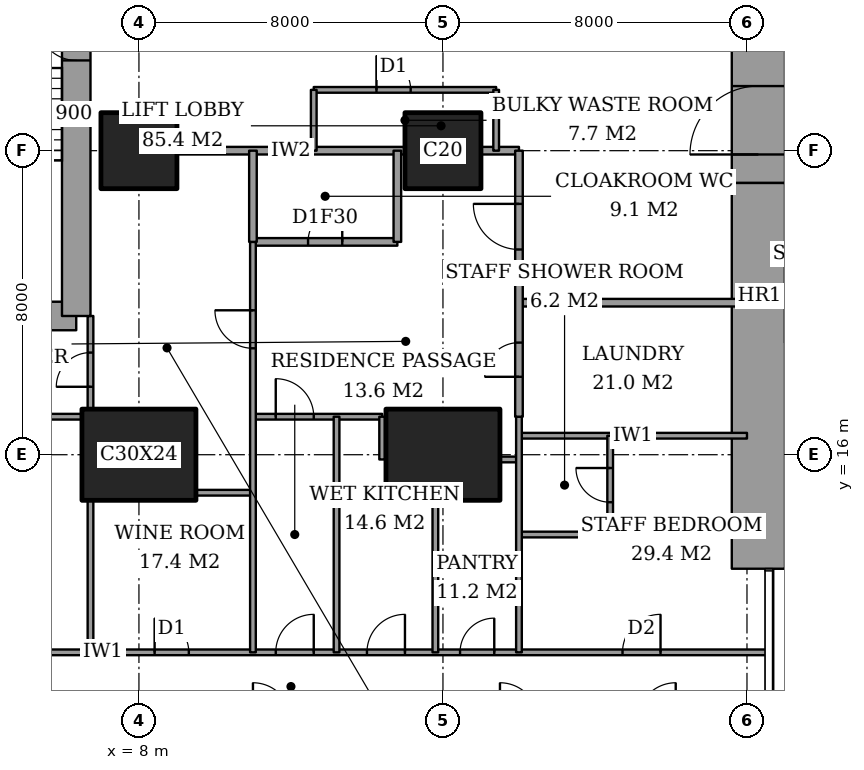
"""IFC4 building model, lengths in metres.
Left out: names, types, materials, properties, quantities, classifications, styles, units other than length and angle.
Written with IfcOpenShell. Run it as: python <this file> out.ifc"""

import sys

from ifc_helpers import new_model, si_unit, direction, frame, frame_2d, origin, origin_2d, place, context, subcontext, project, spatial, rectangle, extrude, element, fill, save


model = new_model("IFC4")
c1 = context("Model", 3, precision=1e-05, world=origin(), true_north=direction((0.0, 1.0)))
c2 = subcontext(c1, "Body", "Model", "MODEL_VIEW")
j1 = project(units=[si_unit("LENGTHUNIT", "METRE"), si_unit("PLANEANGLEUNIT", "RADIAN")], contexts=[c1])
p1 = place(None, origin())
s1 = spatial("IfcSite", under=j1, at=p1, CompositionType="ELEMENT")
p2 = place(p1, origin())
s2 = spatial("IfcBuilding", under=s1, at=p2, CompositionType="ELEMENT")
p3 = place(p2, frame((0.0, 0.0, 99.8)))
s3 = spatial("IfcBuildingStorey", under=s2, at=p3, CompositionType="ELEMENT", Elevation=99.8)
p4 = place(p3, frame((8.0, 16.0, 0.0), z_axis=(0.0, 0.0, 1.0), x_axis=(1.0, 0.0, 0.0)))
e1 = element("IfcColumn", 1, at=p4, inside=s3, PredefinedType="COLUMN", context=c2, shape_type="SweptSolid", body=[
    extrude(rectangle(XDim=3.0, YDim=2.4, at=origin_2d()), origin(), (0.0, 0.0, 1.0), 3.6),
])
p5 = place(p3, frame((8.0, 24.0, 0.0), z_axis=(0.0, 0.0, 1.0), x_axis=(1.0, 0.0, 0.0)))
e2 = element("IfcColumn", 2, at=p5, inside=s3, PredefinedType="COLUMN", context=c2, shape_type="SweptSolid", body=[
    extrude(rectangle(XDim=2.0, YDim=2.0, at=origin_2d()), origin(), (0.0, 0.0, 1.0), 3.6),
])
p6 = place(p3, frame((16.0, 16.0, 0.0), z_axis=(0.0, 0.0, 1.0), x_axis=(1.0, 0.0, 0.0)))
e3 = element("IfcColumn", 3, at=p6, inside=s3, PredefinedType="COLUMN", context=c2, shape_type="SweptSolid", body=[
    extrude(rectangle(XDim=3.0, YDim=2.4, at=origin_2d()), origin(), (0.0, 0.0, 1.0), 3.6),
])
p7 = place(p3, frame((16.0, 24.0, 0.0), z_axis=(0.0, 0.0, 1.0), x_axis=(1.0, 0.0, 0.0)))
e4 = element("IfcColumn", 4, at=p7, inside=s3, PredefinedType="COLUMN", context=c2, shape_type="SweptSolid", body=[
    extrude(rectangle(XDim=2.0, YDim=2.0, at=origin_2d()), origin(), (0.0, 0.0, 1.0), 3.6),
])
p8 = place(p3, frame((24.3, 13.0, 0.0), z_axis=(0.0, 0.0, 1.0), x_axis=(0.0, 1.0, 0.0)))
e5 = element("IfcWall", 5, at=p8, inside=s3, PredefinedType="SHEAR", context=c2, shape_type="SweptSolid", body=[
    extrude(rectangle(XDim=10.15, YDim=1.4, at=frame_2d((5.075, 0.0))), origin(), (0.0, 0.0, 1.0), 3.6),
])
p9 = place(p3, frame((24.3, 23.15, 0.0), z_axis=(0.0, 0.0, 1.0), x_axis=(0.0, 1.0, 0.0)))
e6 = element("IfcWall", 6, at=p9, inside=s3, PredefinedType="SHEAR", context=c2, shape_type="SweptSolid", body=[
    extrude(rectangle(XDim=11.85, YDim=1.4, at=frame_2d((5.925, 0.0))), origin(), (0.0, 0.0, 1.0), 3.6),
])
p10 = place(p9, frame((0.75, 0.0, 0.0)))
e7 = element("IfcOpeningElement", 7, at=p10, cuts=e6, PredefinedType="OPENING", context=c2, shape_type="SweptSolid", body=[
    extrude(rectangle(XDim=1.8, YDim=2.4, at=frame_2d((0.9, 1.2))), frame((0.0, 0.71, 0.0), z_axis=(0.0, -1.0, 0.0), x_axis=(1.0, 0.0, 0.0)), (0.0, 0.0, 1.0), 1.42),
])
p11 = place(p3, frame((1.9, 19.65, 0.0), z_axis=(0.0, 0.0, 1.0), x_axis=(1.0, 0.0, 0.0)))
e8 = element("IfcWall", 8, at=p11, inside=s3, PredefinedType="SHEAR", context=c2, shape_type="SweptSolid", body=[
    extrude(rectangle(XDim=4.45, YDim=0.75, at=frame_2d((2.225, 0.0))), origin(), (0.0, 0.0, 1.0), 3.6),
])
p12 = place(p3, frame((6.35, 19.65, 0.0), z_axis=(0.0, 0.0, 1.0), x_axis=(0.0, 1.0, 0.0)))
e9 = element("IfcWall", 9, at=p12, inside=s3, PredefinedType="SHEAR", context=c2, shape_type="SweptSolid", body=[
    extrude(rectangle(XDim=8.7, YDim=0.75, at=frame_2d((4.35, 0.0))), origin(), (0.0, 0.0, 1.0), 3.6),
])
p13 = place(p12, frame((6.725, 0.0, 0.0)))
e10 = element("IfcOpeningElement", 10, at=p13, cuts=e9, PredefinedType="OPENING", context=c2, shape_type="SweptSolid", body=[
    extrude(rectangle(XDim=1.0, YDim=2.1, at=frame_2d((0.5, 1.05))), frame((0.0, 0.385, 0.0), z_axis=(0.0, -1.0, 0.0), x_axis=(1.0, 0.0, 0.0)), (0.0, 0.0, 1.0), 0.77),
])
p14 = place(p3, frame((-0.45, 10.8, 0.0), z_axis=(0.0, 0.0, 1.0), x_axis=(1.0, 0.0, 0.0)))
e11 = element("IfcWall", 11, at=p14, inside=s3, PredefinedType="PARTITIONING", context=c2, shape_type="SweptSolid", body=[
    extrude(rectangle(XDim=25.011, YDim=0.15, at=frame_2d((12.505, 0.0))), origin(), (0.0, 0.0, 1.0), 3.35),
])
p15 = place(p14, frame((12.05, 0.0, 0.0)))
e12 = element("IfcOpeningElement", 12, at=p15, cuts=e11, PredefinedType="OPENING", context=c2, shape_type="SweptSolid", body=[
    extrude(rectangle(XDim=1.0, YDim=2.1, at=frame_2d((0.5, 1.05))), frame((0.0, 0.085, 0.0), z_axis=(0.0, -1.0, 0.0), x_axis=(1.0, 0.0, 0.0)), (0.0, 0.0, 1.0), 0.17),
])
p16 = place(p14, frame((3.087, 0.0, 0.0)))
e13 = element("IfcOpeningElement", 13, at=p16, cuts=e11, PredefinedType="OPENING", context=c2, shape_type="SweptSolid", body=[
    extrude(rectangle(XDim=1.0, YDim=2.1, at=frame_2d((0.5, 1.05))), frame((0.0, 0.085, 0.0), z_axis=(0.0, -1.0, 0.0), x_axis=(1.0, 0.0, 0.0)), (0.0, 0.0, 1.0), 0.17),
])
p17 = place(p14, frame((8.863, 0.0, 0.0)))
e14 = element("IfcOpeningElement", 14, at=p17, cuts=e11, PredefinedType="OPENING", context=c2, shape_type="SweptSolid", body=[
    extrude(rectangle(XDim=0.9, YDim=2.1, at=frame_2d((0.45, 1.05))), frame((0.0, 0.085, 0.0), z_axis=(0.0, -1.0, 0.0), x_axis=(1.0, 0.0, 0.0)), (0.0, 0.0, 1.0), 0.17),
])
p18 = place(p14, frame((14.45, 0.0, 0.0)))
e15 = element("IfcOpeningElement", 15, at=p18, cuts=e11, PredefinedType="OPENING", context=c2, shape_type="SweptSolid", body=[
    extrude(rectangle(XDim=1.0, YDim=2.1, at=frame_2d((0.5, 1.05))), frame((0.0, 0.085, 0.0), z_axis=(0.0, -1.0, 0.0), x_axis=(1.0, 0.0, 0.0)), (0.0, 0.0, 1.0), 0.17),
])
p19 = place(p14, frame((16.9, 0.0, 0.0)))
e16 = element("IfcOpeningElement", 16, at=p19, cuts=e11, PredefinedType="OPENING", context=c2, shape_type="SweptSolid", body=[
    extrude(rectangle(XDim=0.9, YDim=2.1, at=frame_2d((0.45, 1.05))), frame((0.0, 0.085, 0.0), z_axis=(0.0, -1.0, 0.0), x_axis=(1.0, 0.0, 0.0)), (0.0, 0.0, 1.0), 0.17),
])
p20 = place(p14, frame((21.175, 0.0, 0.0)))
e17 = element("IfcOpeningElement", 17, at=p20, cuts=e11, PredefinedType="OPENING", context=c2, shape_type="SweptSolid", body=[
    extrude(rectangle(XDim=1.0, YDim=2.1, at=frame_2d((0.5, 1.05))), frame((0.0, 0.085, 0.0), z_axis=(0.0, -1.0, 0.0), x_axis=(1.0, 0.0, 0.0)), (0.0, 0.0, 1.0), 0.17),
])
p21 = place(p3, frame((18.0, 13.9, 0.0), z_axis=(0.0, 0.0, 1.0), x_axis=(1.0, 0.0, 0.0)))
e18 = element("IfcWall", 18, at=p21, inside=s3, PredefinedType="PARTITIONING", context=c2, shape_type="SweptSolid", body=[
    extrude(rectangle(XDim=2.4, YDim=0.15, at=frame_2d((1.2, 0.0))), origin(), (0.0, 0.0, 1.0), 3.35),
])
p22 = place(p3, frame((9.5, 15.0, 0.0), z_axis=(0.0, 0.0, 1.0), x_axis=(1.0, 0.0, 0.0)))
e19 = element("IfcWall", 19, at=p22, inside=s3, PredefinedType="PARTITIONING", context=c2, shape_type="SweptSolid", body=[
    extrude(rectangle(XDim=1.5, YDim=0.15, at=frame_2d((0.75, 0.0))), origin(), (0.0, 0.0, 1.0), 3.35),
])
p23 = place(p3, frame((17.5, 15.875, 0.0), z_axis=(0.0, 0.0, 1.0), x_axis=(1.0, 0.0, 0.0)))
e20 = element("IfcWall", 20, at=p23, inside=s3, PredefinedType="PARTITIONING", context=c2, shape_type="SweptSolid", body=[
    extrude(rectangle(XDim=0.5, YDim=0.15, at=frame_2d((0.25, 0.0))), origin(), (0.0, 0.0, 1.0), 2.634),
])
p24 = place(p3, frame((18.0, 16.5, 0.0), z_axis=(0.0, 0.0, 1.0), x_axis=(1.0, 0.0, 0.0)))
e21 = element("IfcWall", 21, at=p24, inside=s3, PredefinedType="PARTITIONING", context=c2, shape_type="SweptSolid", body=[
    extrude(rectangle(XDim=6.0, YDim=0.15, at=frame_2d((3.0, 0.0))), origin(), (0.0, 0.0, 1.0), 3.35),
])
p25 = place(p3, frame((1.35, 17.0, 0.0), z_axis=(0.0, 0.0, 1.0), x_axis=(1.0, 0.0, 0.0)))
e22 = element("IfcWall", 22, at=p25, inside=s3, PredefinedType="PARTITIONING", context=c2, shape_type="SweptSolid", body=[
    extrude(rectangle(XDim=5.15, YDim=0.15, at=frame_2d((2.575, 0.0))), origin(), (0.0, 0.0, 1.0), 3.35),
])
p26 = place(p3, frame((11.0, 17.0, 0.0), z_axis=(0.0, 0.0, 1.0), x_axis=(1.0, 0.0, 0.0)))
e23 = element("IfcWall", 23, at=p26, inside=s3, PredefinedType="PARTITIONING", context=c2, shape_type="SweptSolid", body=[
    extrude(rectangle(XDim=3.4, YDim=0.15, at=frame_2d((1.7, 0.0))), origin(), (0.0, 0.0, 1.0), 3.35),
])
p27 = place(p26, frame((0.6, 0.0, 0.0)))
e24 = element("IfcOpeningElement", 24, at=p27, cuts=e23, PredefinedType="OPENING", context=c2, shape_type="SweptSolid", body=[
    extrude(rectangle(XDim=1.0, YDim=2.1, at=frame_2d((0.5, 1.05))), frame((0.0, 0.085, 0.0), z_axis=(0.0, -1.0, 0.0), x_axis=(1.0, 0.0, 0.0)), (0.0, 0.0, 1.0), 0.17),
])
p28 = place(p3, frame((18.0, 20.0, 0.0), z_axis=(0.0, 0.0, 1.0), x_axis=(1.0, 0.0, 0.0)))
e25 = element("IfcWall", 25, at=p28, inside=s3, PredefinedType="PARTITIONING", context=c2, shape_type="SweptSolid", body=[
    extrude(rectangle(XDim=6.0, YDim=0.2, at=frame_2d((3.0, 0.0))), origin(), (0.0, 0.0, 1.0), 3.35),
])
p29 = place(p3, frame((11.0, 21.6, 0.0), z_axis=(0.0, 0.0, 1.0), x_axis=(1.0, 0.0, 0.0)))
e26 = element("IfcWall", 26, at=p29, inside=s3, PredefinedType="PARTITIONING", context=c2, shape_type="SweptSolid", body=[
    extrude(rectangle(XDim=3.8, YDim=0.2, at=frame_2d((1.9, 0.0))), origin(), (0.0, 0.0, 1.0), 3.35),
])
p30 = place(p29, frame((1.45, 0.0, 0.0)))
e27 = element("IfcOpeningElement", 27, at=p30, cuts=e26, PredefinedType="OPENING", context=c2, shape_type="SweptSolid", body=[
    extrude(rectangle(XDim=0.9, YDim=2.1, at=frame_2d((0.45, 1.05))), frame((0.0, 0.11, 0.0), z_axis=(0.0, -1.0, 0.0), x_axis=(1.0, 0.0, 0.0)), (0.0, 0.0, 1.0), 0.22),
])
p31 = place(p3, frame((9.0, 24.0, 0.0), z_axis=(0.0, 0.0, 1.0), x_axis=(1.0, 0.0, 0.0)))
e28 = element("IfcWall", 28, at=p31, inside=s3, PredefinedType="PARTITIONING", context=c2, shape_type="SweptSolid", body=[
    extrude(rectangle(XDim=6.0, YDim=0.2, at=frame_2d((3.0, 0.0))), origin(), (0.0, 0.0, 1.0), 3.35),
])
p32 = place(p3, frame((17.0, 24.0, 0.0), z_axis=(0.0, 0.0, 1.0), x_axis=(1.0, 0.0, 0.0)))
e29 = element("IfcWall", 29, at=p32, inside=s3, PredefinedType="PARTITIONING", context=c2, shape_type="SweptSolid", body=[
    extrude(rectangle(XDim=1.0, YDim=0.2, at=frame_2d((0.5, 0.0))), origin(), (0.0, 0.0, 1.0), 3.35),
])
p33 = place(p3, frame((12.6, 25.6, 0.0), z_axis=(0.0, 0.0, 1.0), x_axis=(1.0, 0.0, 0.0)))
e30 = element("IfcWall", 30, at=p33, inside=s3, PredefinedType="PARTITIONING", context=c2, shape_type="SweptSolid", body=[
    extrude(rectangle(XDim=4.8, YDim=0.15, at=frame_2d((2.4, 0.0))), origin(), (0.0, 0.0, 1.0), 3.35),
])
p34 = place(p33, frame((1.65, 0.0, 0.0)))
e31 = element("IfcOpeningElement", 31, at=p34, cuts=e30, PredefinedType="OPENING", context=c2, shape_type="SweptSolid", body=[
    extrude(rectangle(XDim=0.9, YDim=2.1, at=frame_2d((0.45, 1.05))), frame((0.0, 0.085, 0.0), z_axis=(0.0, -1.0, 0.0), x_axis=(1.0, 0.0, 0.0)), (0.0, 0.0, 1.0), 0.17),
])
p35 = place(p3, frame((6.725, 10.8, 0.0), z_axis=(0.0, 0.0, 1.0), x_axis=(0.0, 1.0, 0.0)))
e32 = element("IfcWall", 32, at=p35, inside=s3, PredefinedType="PARTITIONING", context=c2, shape_type="SweptSolid", body=[
    extrude(rectangle(XDim=4.0, YDim=0.15, at=frame_2d((2.0, 0.0))), origin(), (0.0, 0.0, 1.0), 3.35),
])
p36 = place(p3, frame((6.725, 17.2, 0.0), z_axis=(0.0, 0.0, 1.0), x_axis=(0.0, 1.0, 0.0)))
e33 = element("IfcWall", 33, at=p36, inside=s3, PredefinedType="PARTITIONING", context=c2, shape_type="SweptSolid", body=[
    extrude(rectangle(XDim=2.45, YDim=0.15, at=frame_2d((1.225, 0.0))), origin(), (0.0, 0.0, 1.0), 3.35),
])
p37 = place(p36, frame((0.587, 0.0, 0.0)))
e34 = element("IfcOpeningElement", 34, at=p37, cuts=e33, PredefinedType="OPENING", context=c2, shape_type="SweptSolid", body=[
    extrude(rectangle(XDim=0.9, YDim=2.1, at=frame_2d((0.45, 1.05))), frame((0.0, 0.085, 0.0), z_axis=(0.0, -1.0, 0.0), x_axis=(1.0, 0.0, 0.0)), (0.0, 0.0, 1.0), 0.17),
])
p38 = place(p3, frame((11.0, 21.6, 0.0), z_axis=(0.0, 0.0, 1.0), x_axis=(0.0, 1.0, 0.0)))
e35 = element("IfcWall", 35, at=p38, inside=s3, PredefinedType="PARTITIONING", context=c2, shape_type="SweptSolid", body=[
    extrude(rectangle(XDim=2.4, YDim=0.2, at=frame_2d((1.2, 0.0))), origin(), (0.0, 0.0, 1.0), 3.35),
])
p39 = place(p3, frame((11.0, 10.8, 0.0), z_axis=(0.0, 0.0, 1.0), x_axis=(0.0, 1.0, 0.0)))
e36 = element("IfcWall", 36, at=p39, inside=s3, PredefinedType="PARTITIONING", context=c2, shape_type="SweptSolid", body=[
    extrude(rectangle(XDim=10.8, YDim=0.15, at=frame_2d((5.4, 0.0))), origin(), (0.0, 0.0, 1.0), 3.35),
])
p40 = place(p39, frame((8.0, 0.0, 0.0)))
e37 = element("IfcOpeningElement", 37, at=p40, cuts=e36, PredefinedType="OPENING", context=c2, shape_type="SweptSolid", body=[
    extrude(rectangle(XDim=1.0, YDim=2.1, at=frame_2d((0.5, 1.05))), frame((0.0, 0.085, 0.0), z_axis=(0.0, -1.0, 0.0), x_axis=(1.0, 0.0, 0.0)), (0.0, 0.0, 1.0), 0.17),
])
p41 = place(p3, frame((12.6, 24.0, 0.0), z_axis=(0.0, 0.0, 1.0), x_axis=(0.0, 1.0, 0.0)))
e38 = element("IfcWall", 38, at=p41, inside=s3, PredefinedType="PARTITIONING", context=c2, shape_type="SweptSolid", body=[
    extrude(rectangle(XDim=1.6, YDim=0.15, at=frame_2d((0.8, 0.0))), origin(), (0.0, 0.0, 1.0), 3.35),
])
p42 = place(p3, frame((13.2, 10.8, 0.0), z_axis=(0.0, 0.0, 1.0), x_axis=(0.0, 1.0, 0.0)))
e39 = element("IfcWall", 39, at=p42, inside=s3, PredefinedType="PARTITIONING", context=c2, shape_type="SweptSolid", body=[
    extrude(rectangle(XDim=6.2, YDim=0.15, at=frame_2d((3.1, 0.0))), origin(), (0.0, 0.0, 1.0), 3.35),
])
p43 = place(p3, frame((14.4, 15.875, 0.0), z_axis=(0.0, 0.0, 1.0), x_axis=(0.0, 1.0, 0.0)))
e40 = element("IfcWall", 40, at=p43, inside=s3, PredefinedType="PARTITIONING", context=c2, shape_type="SweptSolid", body=[
    extrude(rectangle(XDim=1.125, YDim=0.15, at=frame_2d((0.562, 0.0))), origin(), (0.0, 0.0, 1.0), 3.35),
])
p44 = place(p3, frame((14.8, 21.6, 0.0), z_axis=(0.0, 0.0, 1.0), x_axis=(0.0, 1.0, 0.0)))
e41 = element("IfcWall", 41, at=p44, inside=s3, PredefinedType="PARTITIONING", context=c2, shape_type="SweptSolid", body=[
    extrude(rectangle(XDim=2.4, YDim=0.2, at=frame_2d((1.2, 0.0))), origin(), (0.0, 0.0, 1.0), 3.35),
])
p45 = place(p3, frame((15.8, 10.8, 0.0), z_axis=(0.0, 0.0, 1.0), x_axis=(0.0, 1.0, 0.0)))
e42 = element("IfcWall", 42, at=p45, inside=s3, PredefinedType="PARTITIONING", context=c2, shape_type="SweptSolid", body=[
    extrude(rectangle(XDim=4.0, YDim=0.15, at=frame_2d((2.0, 0.0))), origin(), (0.0, 0.0, 1.0), 3.35),
])
p46 = place(p3, frame((17.4, 24.0, 0.0), z_axis=(0.0, 0.0, 1.0), x_axis=(0.0, 1.0, 0.0)))
e43 = element("IfcWall", 43, at=p46, inside=s3, PredefinedType="PARTITIONING", context=c2, shape_type="SweptSolid", body=[
    extrude(rectangle(XDim=1.6, YDim=0.15, at=frame_2d((0.8, 0.0))), origin(), (0.0, 0.0, 1.0), 3.35),
])
p47 = place(p3, frame((18.0, 17.0, 0.0), z_axis=(0.0, 0.0, 1.0), x_axis=(0.0, 1.0, 0.0)))
e44 = element("IfcWall", 44, at=p47, inside=s3, PredefinedType="PARTITIONING", context=c2, shape_type="SweptSolid", body=[
    extrude(rectangle(XDim=7.0, YDim=0.2, at=frame_2d((3.5, 0.0))), origin(), (0.0, 0.0, 1.0), 3.35),
])
p48 = place(p47, frame((4.4, 0.0, 0.0)))
e45 = element("IfcOpeningElement", 45, at=p48, cuts=e44, PredefinedType="OPENING", context=c2, shape_type="SweptSolid", body=[
    extrude(rectangle(XDim=1.2, YDim=2.4, at=frame_2d((0.6, 1.2))), frame((0.0, 0.11, 0.0), z_axis=(0.0, -1.0, 0.0), x_axis=(1.0, 0.0, 0.0)), (0.0, 0.0, 1.0), 0.22),
])
p49 = place(p47, frame((1.05, 0.0, 0.0)))
e46 = element("IfcOpeningElement", 46, at=p49, cuts=e44, PredefinedType="OPENING", context=c2, shape_type="SweptSolid", body=[
    extrude(rectangle(XDim=0.9, YDim=2.1, at=frame_2d((0.45, 1.05))), frame((0.0, 0.11, 0.0), z_axis=(0.0, -1.0, 0.0), x_axis=(1.0, 0.0, 0.0)), (0.0, 0.0, 1.0), 0.22),
])
p50 = place(p3, frame((18.0, 10.8, 0.0), z_axis=(0.0, 0.0, 1.0), x_axis=(0.0, 1.0, 0.0)))
e47 = element("IfcWall", 47, at=p50, inside=s3, PredefinedType="PARTITIONING", context=c2, shape_type="SweptSolid", body=[
    extrude(rectangle(XDim=6.2, YDim=0.15, at=frame_2d((3.1, 0.0))), origin(), (0.0, 0.0, 1.0), 3.35),
])
p51 = place(p3, frame((20.4, 13.9, 0.0), z_axis=(0.0, 0.0, 1.0), x_axis=(0.0, 1.0, 0.0)))
e48 = element("IfcWall", 48, at=p51, inside=s3, PredefinedType="PARTITIONING", context=c2, shape_type="SweptSolid", body=[
    extrude(rectangle(XDim=2.6, YDim=0.15, at=frame_2d((1.3, 0.0))), origin(), (0.0, 0.0, 1.0), 3.35),
])
p52 = place(p51, frame((0.85, 0.0, 0.0)))
e49 = element("IfcOpeningElement", 49, at=p52, cuts=e48, PredefinedType="OPENING", context=c2, shape_type="SweptSolid", body=[
    extrude(rectangle(XDim=0.9, YDim=2.1, at=frame_2d((0.45, 1.05))), frame((0.0, 0.085, 0.0), z_axis=(0.0, -1.0, 0.0), x_axis=(1.0, 0.0, 0.0)), (0.0, 0.0, 1.0), 0.17),
])
p53 = place(p15, origin())
e50 = element("IfcDoor", 50, at=p53, inside=s3, OperationType="SINGLE_SWING_LEFT", PredefinedType="DOOR", context=c2, shape_type="SweptSolid", body=[
    extrude(rectangle(XDim=1.0, YDim=2.1, at=frame_2d((0.5, 1.05))), frame((0.0, 0.025, 0.0), z_axis=(0.0, -1.0, 0.0), x_axis=(1.0, 0.0, 0.0)), (0.0, 0.0, 1.0), 0.05),
])
fill(e12, e50)
p54 = place(p37, origin())
e51 = element("IfcDoor", 51, at=p54, inside=s3, OperationType="SINGLE_SWING_RIGHT", PredefinedType="DOOR", context=c2, shape_type="SweptSolid", body=[
    extrude(rectangle(XDim=0.9, YDim=2.1, at=frame_2d((0.45, 1.05))), frame((0.0, 0.025, 0.0), z_axis=(0.0, -1.0, 0.0), x_axis=(1.0, 0.0, 0.0)), (0.0, 0.0, 1.0), 0.05),
])
fill(e34, e51)
p55 = place(p17, origin())
e52 = element("IfcDoor", 52, at=p55, inside=s3, OperationType="SINGLE_SWING_RIGHT", PredefinedType="DOOR", context=c2, shape_type="SweptSolid", body=[
    extrude(rectangle(XDim=0.9, YDim=2.1, at=frame_2d((0.45, 1.05))), frame((0.0, 0.025, 0.0), z_axis=(0.0, -1.0, 0.0), x_axis=(1.0, 0.0, 0.0)), (0.0, 0.0, 1.0), 0.05),
])
fill(e14, e52)
p56 = place(p40, origin())
e53 = element("IfcDoor", 53, at=p56, inside=s3, OperationType="SINGLE_SWING_LEFT", PredefinedType="DOOR", context=c2, shape_type="SweptSolid", body=[
    extrude(rectangle(XDim=1.0, YDim=2.1, at=frame_2d((0.5, 1.05))), frame((0.0, 0.025, 0.0), z_axis=(0.0, -1.0, 0.0), x_axis=(1.0, 0.0, 0.0)), (0.0, 0.0, 1.0), 0.05),
])
fill(e37, e53)
p57 = place(p30, origin())
e54 = element("IfcDoor", 54, at=p57, inside=s3, OperationType="SINGLE_SWING_LEFT", PredefinedType="DOOR", context=c2, shape_type="SweptSolid", body=[
    extrude(rectangle(XDim=0.9, YDim=2.1, at=frame_2d((0.45, 1.05))), frame((0.0, 0.025, 0.0), z_axis=(0.0, -1.0, 0.0), x_axis=(1.0, 0.0, 0.0)), (0.0, 0.0, 1.0), 0.05),
])
fill(e27, e54)
p58 = place(p48, origin())
e55 = element("IfcDoor", 55, at=p58, inside=s3, OperationType="SINGLE_SWING_LEFT", PredefinedType="DOOR", context=c2, shape_type="SweptSolid", body=[
    extrude(rectangle(XDim=1.2, YDim=2.4, at=frame_2d((0.6, 1.2))), frame((0.0, 0.025, 0.0), z_axis=(0.0, -1.0, 0.0), x_axis=(1.0, 0.0, 0.0)), (0.0, 0.0, 1.0), 0.05),
])
fill(e45, e55)
p59 = place(p27, origin())
e56 = element("IfcDoor", 56, at=p59, inside=s3, OperationType="SINGLE_SWING_RIGHT", PredefinedType="DOOR", context=c2, shape_type="SweptSolid", body=[
    extrude(rectangle(XDim=1.0, YDim=2.1, at=frame_2d((0.5, 1.05))), frame((0.0, 0.025, 0.0), z_axis=(0.0, -1.0, 0.0), x_axis=(1.0, 0.0, 0.0)), (0.0, 0.0, 1.0), 0.05),
])
fill(e24, e56)
p60 = place(p18, origin())
e57 = element("IfcDoor", 57, at=p60, inside=s3, OperationType="SINGLE_SWING_LEFT", PredefinedType="DOOR", context=c2, shape_type="SweptSolid", body=[
    extrude(rectangle(XDim=1.0, YDim=2.1, at=frame_2d((0.5, 1.05))), frame((0.0, 0.025, 0.0), z_axis=(0.0, -1.0, 0.0), x_axis=(1.0, 0.0, 0.0)), (0.0, 0.0, 1.0), 0.05),
])
fill(e15, e57)
p61 = place(p19, origin())
e58 = element("IfcDoor", 58, at=p61, inside=s3, OperationType="SINGLE_SWING_LEFT", PredefinedType="DOOR", context=c2, shape_type="SweptSolid", body=[
    extrude(rectangle(XDim=0.9, YDim=2.1, at=frame_2d((0.45, 1.05))), frame((0.0, 0.025, 0.0), z_axis=(0.0, -1.0, 0.0), x_axis=(1.0, 0.0, 0.0)), (0.0, 0.0, 1.0), 0.05),
])
fill(e16, e58)
p62 = place(p52, origin())
e59 = element("IfcDoor", 59, at=p62, inside=s3, OperationType="SINGLE_SWING_LEFT", PredefinedType="DOOR", context=c2, shape_type="SweptSolid", body=[
    extrude(rectangle(XDim=0.9, YDim=2.1, at=frame_2d((0.45, 1.05))), frame((0.0, 0.025, 0.0), z_axis=(0.0, -1.0, 0.0), x_axis=(1.0, 0.0, 0.0)), (0.0, 0.0, 1.0), 0.05),
])
fill(e49, e59)
p63 = place(p20, origin())
e60 = element("IfcDoor", 60, at=p63, inside=s3, OperationType="SINGLE_SWING_LEFT", PredefinedType="DOOR", context=c2, shape_type="SweptSolid", body=[
    extrude(rectangle(XDim=1.0, YDim=2.1, at=frame_2d((0.5, 1.05))), frame((0.0, 0.025, 0.0), z_axis=(0.0, -1.0, 0.0), x_axis=(1.0, 0.0, 0.0)), (0.0, 0.0, 1.0), 0.05),
])
fill(e17, e60)
p64 = place(p49, origin())
e61 = element("IfcDoor", 61, at=p64, inside=s3, OperationType="SINGLE_SWING_RIGHT", PredefinedType="DOOR", context=c2, shape_type="SweptSolid", body=[
    extrude(rectangle(XDim=0.9, YDim=2.1, at=frame_2d((0.45, 1.05))), frame((0.0, 0.025, 0.0), z_axis=(0.0, -1.0, 0.0), x_axis=(1.0, 0.0, 0.0)), (0.0, 0.0, 1.0), 0.05),
])
fill(e46, e61)
p65 = place(p34, origin())
e62 = element("IfcDoor", 62, at=p65, inside=s3, OperationType="SINGLE_SWING_RIGHT", PredefinedType="DOOR", context=c2, shape_type="SweptSolid", body=[
    extrude(rectangle(XDim=0.9, YDim=2.1, at=frame_2d((0.45, 1.05))), frame((0.0, 0.025, 0.0), z_axis=(0.0, -1.0, 0.0), x_axis=(1.0, 0.0, 0.0)), (0.0, 0.0, 1.0), 0.05),
])
fill(e31, e62)
p66 = place(p10, origin())
e63 = element("IfcDoor", 63, at=p66, inside=s3, OperationType="DOUBLE_DOOR_DOUBLE_SWING", PredefinedType="DOOR", context=c2, shape_type="SweptSolid", body=[
    extrude(rectangle(XDim=1.8, YDim=2.4, at=frame_2d((0.9, 1.2))), frame((0.0, 0.025, 0.0), z_axis=(0.0, -1.0, 0.0), x_axis=(1.0, 0.0, 0.0)), (0.0, 0.0, 1.0), 0.05),
])
fill(e7, e63)
p67 = place(p13, origin())
e64 = element("IfcDoor", 64, at=p67, inside=s3, OperationType="SINGLE_SWING_LEFT", PredefinedType="DOOR", context=c2, shape_type="SweptSolid", body=[
    extrude(rectangle(XDim=1.0, YDim=2.1, at=frame_2d((0.5, 1.05))), frame((0.0, 0.025, 0.0), z_axis=(0.0, -1.0, 0.0), x_axis=(1.0, 0.0, 0.0)), (0.0, 0.0, 1.0), 0.05),
])
fill(e10, e64)
save(model, sys.argv[1])
